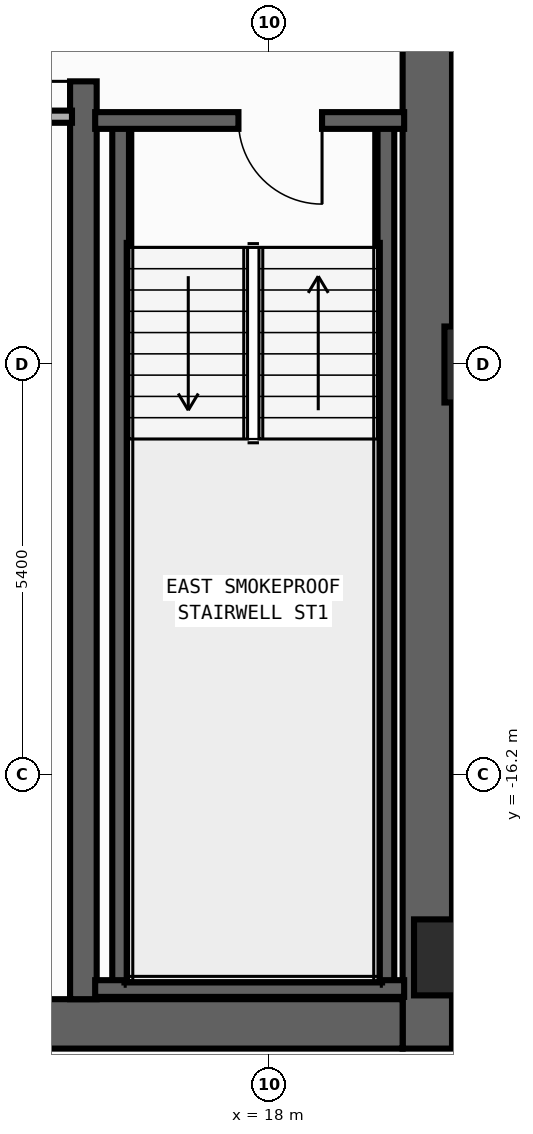
"""IFC4 building model, lengths in metres.
Left out: names, types, materials, properties, quantities, classifications, styles, units other than length and angle.
Written with IfcOpenShell. Run it as: python <this file> out.ifc"""

import sys

from ifc_helpers import new_model, si_unit, direction, frame, frame_2d, origin, origin_2d, place, context, subcontext, project, spatial, rectangle, extrude, element, fill, save


model = new_model("IFC4")
c1 = context("Model", 3, precision=1e-05, world=origin(), true_north=direction((0.0, 1.0)))
c2 = subcontext(c1, "Body", "Model", "MODEL_VIEW")
j1 = project(units=[si_unit("LENGTHUNIT", "METRE"), si_unit("PLANEANGLEUNIT", "RADIAN")], contexts=[c1])
p1 = place(None, origin())
s1 = spatial("IfcSite", under=j1, at=p1, CompositionType="ELEMENT")
p2 = place(p1, origin())
s2 = spatial("IfcBuilding", under=s1, at=p2, CompositionType="ELEMENT")
p3 = place(p2, frame((0.0, 0.0, 172.6)))
s3 = spatial("IfcBuildingStorey", under=s2, at=p3, CompositionType="ELEMENT", Elevation=172.6)
p4 = place(p3, frame((20.075, -19.8, 0.0), z_axis=(0.0, 0.0, 1.0), x_axis=(0.0, 1.0, 0.0)))
e1 = element("IfcWall", 1, at=p4, inside=s3, PredefinedType="SHEAR", context=c2, shape_type="SweptSolid", body=[
    extrude(rectangle(XDim=27.0, YDim=0.65, at=frame_2d((13.5, 0.0))), origin(), (0.0, 0.0, 1.0), 3.54),
])
p5 = place(p3, frame((12.65, -19.475, 0.0), z_axis=(0.0, 0.0, 1.0), x_axis=(1.0, 0.0, 0.0)))
e2 = element("IfcWall", 2, at=p5, inside=s3, PredefinedType="SHEAR", context=c2, shape_type="SweptSolid", body=[
    extrude(rectangle(XDim=7.1, YDim=0.65, at=frame_2d((3.55, 0.0))), origin(), (0.0, 0.0, 1.0), 3.54),
])
p6 = place(p3, frame((15.55, -19.15, 0.0), z_axis=(0.0, 0.0, 1.0), x_axis=(0.0, 1.0, 0.0)))
e3 = element("IfcWall", 3, at=p6, inside=s3, PredefinedType="SHEAR", context=c2, shape_type="SweptSolid", body=[
    extrude(rectangle(XDim=25.7, YDim=0.35, at=frame_2d((12.85, 0.0))), origin(), (0.0, 0.0, 1.0), 3.54),
])
p7 = place(p6, frame((12.075, 0.0, 0.0)))
e4 = element("IfcOpeningElement", 4, at=p7, cuts=e3, PredefinedType="OPENING", context=c2, shape_type="SweptSolid", body=[
    extrude(rectangle(XDim=1.15, YDim=2.2, at=frame_2d((0.575, 1.1))), frame((0.0, 0.185, 0.0), z_axis=(0.0, -1.0, 0.0), x_axis=(1.0, 0.0, 0.0)), (0.0, 0.0, 1.0), 0.37),
])
p8 = place(p6, frame((24.475, 0.0, 0.0)))
e5 = element("IfcOpeningElement", 5, at=p8, cuts=e3, PredefinedType="OPENING", context=c2, shape_type="SweptSolid", body=[
    extrude(rectangle(XDim=0.85, YDim=2.1, at=frame_2d((0.425, 1.05))), frame((0.0, 0.185, 0.0), z_axis=(0.0, -1.0, 0.0), x_axis=(1.0, 0.0, 0.0)), (0.0, 0.0, 1.0), 0.37),
])
for number, where, z_axis, x_axis in (
    (6, (16.04, -19.01, 0.0), (0.0, 0.0, 1.0), (0.0, 1.0, 0.0)),
    (7, (19.53, -19.01, 0.0), (0.0, 0.0, 1.0), (0.0, 1.0, 0.0)),
):
    element("IfcWall", number, at=place(p3, frame(where, z_axis=z_axis, x_axis=x_axis)), inside=s3, PredefinedType="SHEAR", context=c2, shape_type="SweptSolid", body=[
        extrude(rectangle(XDim=11.42, YDim=0.22, at=frame_2d((5.71, 0.0))), origin(), (0.0, 0.0, 1.0), 3.54),
    ])
p9 = place(p3, frame((15.705, -19.01, 0.0), z_axis=(0.0, 0.0, 1.0), x_axis=(1.0, 0.0, 0.0)))
e8 = element("IfcWall", 8, at=p9, inside=s3, PredefinedType="SHEAR", context=c2, shape_type="SweptSolid", body=[
    extrude(rectangle(XDim=4.065, YDim=0.22, at=frame_2d((2.032, 0.0))), origin(), (0.0, 0.0, 1.0), 3.54),
])
p10 = place(p3, frame((19.77, -7.59, 0.0), z_axis=(0.0, 0.0, 1.0), x_axis=(-1.0, 0.0, 0.0)))
e9 = element("IfcWall", 9, at=p10, inside=s3, PredefinedType="SHEAR", context=c2, shape_type="SweptSolid", body=[
    extrude(rectangle(XDim=4.065, YDim=0.22, at=frame_2d((2.032, 0.0))), origin(), (0.0, 0.0, 1.0), 3.54),
])
p11 = place(p10, frame((1.08, 0.0, 0.0)))
e10 = element("IfcOpeningElement", 10, at=p11, cuts=e9, PredefinedType="OPENING", context=c2, shape_type="SweptSolid", body=[
    extrude(rectangle(XDim=1.1, YDim=2.2, at=frame_2d((0.55, 1.1))), frame((0.0, 0.12, 0.0), z_axis=(0.0, -1.0, 0.0), x_axis=(1.0, 0.0, 0.0)), (0.0, 0.0, 1.0), 0.24),
])
for number, where, z_axis, x_axis in (
    (11, (20.4, -18.6, 0.0), (0.0, 0.0, 1.0), (1.0, 0.0, 0.0)),
    (12, (20.8, -10.8, 0.0), (0.0, 0.0, 1.0), (1.0, 0.0, 0.0)),
):
    element("IfcColumn", number, at=place(p3, frame(where, z_axis=z_axis, x_axis=x_axis)), inside=s3, PredefinedType="COLUMN", context=c2, shape_type="SweptSolid", body=[
        extrude(rectangle(XDim=1.0, YDim=1.0, at=origin_2d()), origin(), (0.0, 0.0, 1.0), 3.8),
    ])
p12 = place(p3, frame((12.8, -7.54, 0.0), z_axis=(0.0, 0.0, 1.0), x_axis=(1.0, 0.0, 0.0)))
e13 = element("IfcWall", 13, at=p12, inside=s3, PredefinedType="STANDARD", context=c2, shape_type="SweptSolid", body=[
    extrude(rectangle(XDim=2.6, YDim=0.16, at=frame_2d((1.3, 0.0))), origin(), (0.0, 0.0, 1.0), 3.54),
])
p13 = place(p11, origin())
e14 = element("IfcDoor", 14, at=p13, inside=s3, OperationType="SINGLE_SWING_LEFT", PredefinedType="DOOR", context=c2, shape_type="SweptSolid", body=[
    extrude(rectangle(XDim=1.1, YDim=2.2, at=frame_2d((0.55, 1.1))), frame((0.0, 0.025, 0.0), z_axis=(0.0, -1.0, 0.0), x_axis=(1.0, 0.0, 0.0)), (0.0, 0.0, 1.0), 0.05),
])
fill(e10, e14)
p14 = place(p7, origin())
e15 = element("IfcDoor", 15, at=p14, inside=s3, OperationType="SINGLE_SWING_LEFT", PredefinedType="DOOR", context=c2, shape_type="SweptSolid", body=[
    extrude(rectangle(XDim=1.15, YDim=2.2, at=frame_2d((0.575, 1.1))), frame((0.0, 0.025, 0.0), z_axis=(0.0, -1.0, 0.0), x_axis=(1.0, 0.0, 0.0)), (0.0, 0.0, 1.0), 0.05),
])
fill(e4, e15)
save(model, sys.argv[1])
